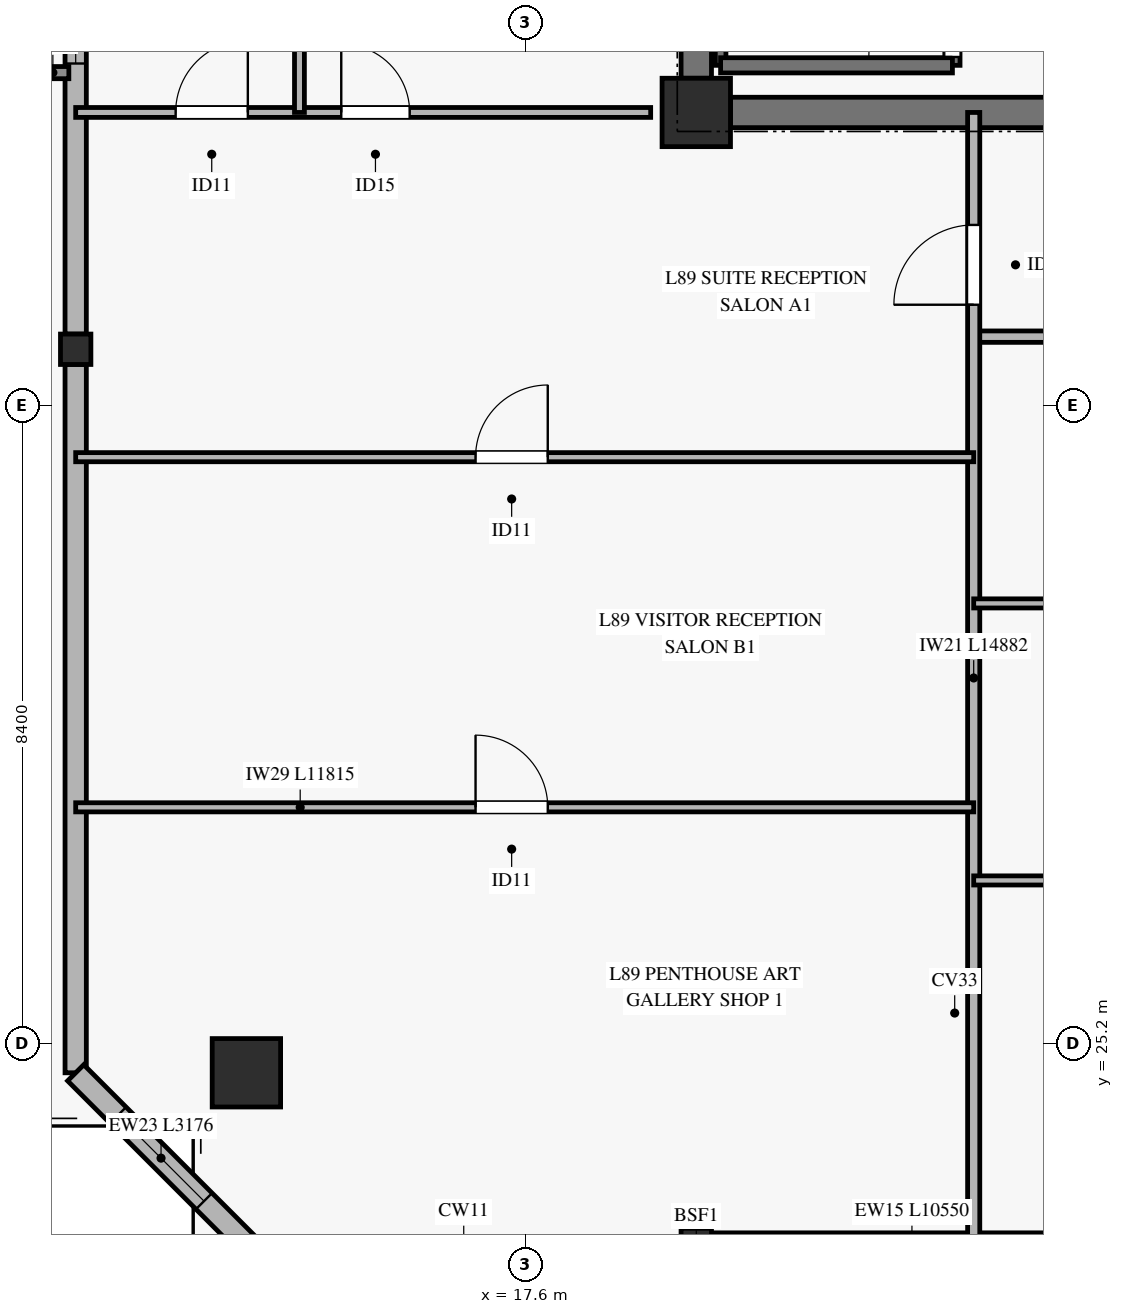
"""IFC4 building model, lengths in metres.
Left out: names, types, materials, properties, quantities, classifications, styles, units other than length and angle.
Written with IfcOpenShell. Run it as: python <this file> out.ifc"""

import sys

from ifc_helpers import new_model, si_unit, direction, frame, frame_2d, origin, origin_2d, place, context, subcontext, project, spatial, rectangle, hollow_rectangle, extrude, source, transform, mapped, element, fill, save


model = new_model("IFC4")
c1 = context("Model", 3, precision=1e-05, world=origin(), true_north=direction((0.0, 1.0)))
c2 = subcontext(c1, "Body", "Model", "MODEL_VIEW")
j1 = project(units=[si_unit("LENGTHUNIT", "METRE"), si_unit("PLANEANGLEUNIT", "RADIAN")], contexts=[c1])
p1 = place(None, origin())
s1 = spatial("IfcSite", under=j1, at=p1, CompositionType="ELEMENT")
p2 = place(p1, origin())
s2 = spatial("IfcBuilding", under=s1, at=p2, CompositionType="ELEMENT")
p3 = place(p2, frame((0.0, 0.0, 342.5)))
s3 = spatial("IfcBuildingStorey", under=s2, at=p3, CompositionType="ELEMENT", Elevation=342.5)
m1 = source(origin(), c2, "Body", "SweptSolid", [
    extrude(rectangle(XDim=0.9, YDim=0.9, at=origin_2d()), origin(), (0.0, 0.0, 1.0), 3.185),
])
p4 = place(p3, frame((19.85, 37.45, 0.0), z_axis=(0.0, 0.0, 1.0), x_axis=(1.0, 0.0, 0.0)))
e1 = element("IfcColumn", 1, at=p4, inside=s3, PredefinedType="PILASTER", context=c2, shape_type="MappedRepresentation", body=[
    mapped(m1, transform((0.0, 0.0, 0.0), x_axis=(1.0, 0.0, 0.0), y_axis=(0.0, 1.0, 0.0), z_axis=(0.0, 0.0, 1.0), scale=1.0)),
])
p5 = place(p3, frame((20.3, 37.45, 0.0), z_axis=(0.0, 0.0, 1.0), x_axis=(1.0, 0.0, 0.0)))
e2 = element("IfcWall", 2, at=p5, inside=s3, PredefinedType="SHEAR", context=c2, shape_type="SweptSolid", body=[
    extrude(rectangle(XDim=10.05, YDim=0.4, at=frame_2d((5.025, 0.0))), origin(), (0.0, 0.0, 1.0), 3.185),
])
p6 = place(p5, frame((4.25, 0.0, 0.0)))
e3 = element("IfcOpeningElement", 3, at=p6, cuts=e2, PredefinedType="OPENING", context=c2, shape_type="SweptSolid", body=[
    extrude(rectangle(XDim=1.2, YDim=2.15, at=frame_2d((0.6, 1.075))), frame((0.0, 0.21, 0.0), z_axis=(0.0, -1.0, 0.0), x_axis=(1.0, 0.0, 0.0)), (0.0, 0.0, 1.0), 0.42),
])
p7 = place(p3, frame((19.85, 37.9, 0.0), z_axis=(0.0, 0.0, 1.0), x_axis=(0.0, 1.0, 0.0)))
e4 = element("IfcWall", 4, at=p7, inside=s3, PredefinedType="SHEAR", context=c2, shape_type="SweptSolid", body=[
    extrude(rectangle(XDim=8.2, YDim=0.4, at=frame_2d((4.1, 0.0))), origin(), (0.0, 0.0, 1.0), 3.185),
])
m2 = source(origin(), c2, "Body", "SweptSolid", [
    extrude(hollow_rectangle(XDim=0.9, YDim=0.9, WallThickness=0.04, at=origin_2d()), origin(), (0.0, 0.0, 1.0), 3.326),
])
p8 = place(p3, frame((13.931, 24.814, 0.0), z_axis=(0.110968509205, 0.266339100467, 0.957470351252), x_axis=(-0.923084448442, 0.384597323242, 0.0)))
e5 = element("IfcColumn", 5, at=p8, inside=s3, PredefinedType="COLUMN", context=c2, shape_type="MappedRepresentation", body=[
    mapped(m2, transform((0.0, 0.0, 0.0), x_axis=(1.0, 0.0, 0.0), y_axis=(0.0, 1.0, 0.0), z_axis=(0.0, 0.0, 1.0), scale=1.0)),
])
m3 = source(origin(), c2, "Body", "SweptSolid", [
    extrude(hollow_rectangle(XDim=0.4, YDim=0.4, WallThickness=0.02, at=origin_2d()), origin(), (0.0, 0.0, 1.0), 3.319),
])
p9 = place(p3, frame((19.85, 22.568, 0.0), z_axis=(0.0, 0.280807850571, 0.959764008003), x_axis=(-1.0, 0.0, 0.0)))
e6 = element("IfcColumn", 6, at=p9, inside=s3, PredefinedType="COLUMN", context=c2, shape_type="MappedRepresentation", body=[
    mapped(m3, transform((0.0, 0.0, 0.0), x_axis=(1.0, 0.0, 0.0), y_axis=(0.0, 1.0, 0.0), z_axis=(0.0, 0.0, 1.0), scale=1.0)),
])
m4 = source(origin(), c2, "Body", "SweptSolid", [
    extrude(hollow_rectangle(XDim=0.4, YDim=0.4, WallThickness=0.02, at=origin_2d()), origin(), (0.0, 0.0, 1.0), 3.246),
])
p10 = place(p3, frame((11.685, 34.334, 0.0), z_axis=(0.127876528395, 0.143597819239, 0.981339523201), x_axis=(-0.746804669772, 0.665043446104, 0.0)))
e7 = element("IfcColumn", 7, at=p10, inside=s3, PredefinedType="COLUMN", context=c2, shape_type="MappedRepresentation", body=[
    mapped(m4, transform((0.0, 0.0, 0.0), x_axis=(1.0, 0.0, 0.0), y_axis=(0.0, 1.0, 0.0), z_axis=(0.0, 0.0, 1.0), scale=1.0)),
])
p11 = place(p3, frame((20.05, 22.568, 0.0), z_axis=(0.0, 0.0, 1.0), x_axis=(1.0, 0.0, 0.0)))
e8 = element("IfcWall", 8, at=p11, inside=s3, PredefinedType="SOLIDWALL", context=c2, shape_type="SweptSolid", body=[
    extrude(rectangle(XDim=10.55, YDim=0.28, at=frame_2d((5.275, 0.0))), origin(), (0.0, 0.0, 1.0), 2.815),
])
p12 = place(p11, frame((4.35, 0.0, 0.0)))
e9 = element("IfcOpeningElement", 9, at=p12, cuts=e8, PredefinedType="OPENING", context=c2, shape_type="SweptSolid", body=[
    extrude(rectangle(XDim=1.8, YDim=2.25, at=frame_2d((0.9, 1.125))), frame((0.0, 0.15, 0.0), z_axis=(0.0, -1.0, 0.0), x_axis=(1.0, 0.0, 0.0)), (0.0, 0.0, 1.0), 0.3),
])
p13 = place(p11, frame((0.65, 0.0, 0.45)))
e10 = element("IfcOpeningElement", 10, at=p13, cuts=e8, PredefinedType="OPENING", context=c2, shape_type="SweptSolid", body=[
    extrude(rectangle(XDim=2.2, YDim=2.1, at=frame_2d((1.1, 1.05))), frame((0.0, 0.15, 0.0), z_axis=(0.0, -1.0, 0.0), x_axis=(1.0, 0.0, 0.0)), (0.0, 0.0, 1.0), 0.3),
])
p14 = place(p11, frame((7.35, 0.0, 0.45)))
e11 = element("IfcOpeningElement", 11, at=p14, cuts=e8, PredefinedType="OPENING", context=c2, shape_type="SweptSolid", body=[
    extrude(rectangle(XDim=1.6, YDim=2.0, at=frame_2d((0.8, 1.0))), frame((0.0, 0.15, 0.0), z_axis=(0.0, -1.0, 0.0), x_axis=(1.0, 0.0, 0.0)), (0.0, 0.0, 1.0), 0.3),
])
p15 = place(p3, frame((11.685, 24.814, 0.0), z_axis=(0.0, 0.0, 1.0), x_axis=(0.0, 1.0, 0.0)))
e12 = element("IfcWall", 12, at=p15, inside=s3, PredefinedType="SOLIDWALL", context=c2, shape_type="SweptSolid", body=[
    extrude(rectangle(XDim=9.32, YDim=0.28, at=frame_2d((4.66, 0.0))), origin(), (0.0, 0.0, 1.0), 2.815),
])
p16 = place(p3, frame((11.685, 34.534, 0.0), z_axis=(0.0, 0.0, 1.0), x_axis=(0.0, 1.0, 0.0)))
e13 = element("IfcWall", 13, at=p16, inside=s3, PredefinedType="SOLIDWALL", context=c2, shape_type="SweptSolid", body=[
    extrude(rectangle(XDim=9.32, YDim=0.28, at=frame_2d((4.66, 0.0))), origin(), (0.0, 0.0, 1.0), 2.815),
])
p17 = place(p16, frame((3.56, 0.0, 0.45)))
e14 = element("IfcOpeningElement", 14, at=p17, cuts=e13, PredefinedType="OPENING", context=c2, shape_type="SweptSolid", body=[
    extrude(rectangle(XDim=2.2, YDim=2.1, at=frame_2d((1.1, 1.05))), frame((0.0, 0.15, 0.0), z_axis=(0.0, -1.0, 0.0), x_axis=(1.0, 0.0, 0.0)), (0.0, 0.0, 1.0), 0.3),
])
p18 = place(p3, frame((11.685, 24.814, 0.0), z_axis=(0.0, 0.0, 1.0), x_axis=(0.707106781187, -0.707106781187, 0.0)))
e15 = element("IfcWall", 15, at=p18, inside=s3, PredefinedType="SOLIDWALL", context=c2, shape_type="SweptSolid", body=[
    extrude(rectangle(XDim=3.176, YDim=0.3, at=frame_2d((1.588, 0.0))), origin(), (0.0, 0.0, 1.0), 2.815),
])
p19 = place(p18, frame((0.788, 0.0, 0.45)))
e16 = element("IfcOpeningElement", 16, at=p19, cuts=e15, PredefinedType="OPENING", context=c2, shape_type="SweptSolid", body=[
    extrude(rectangle(XDim=1.6, YDim=2.0, at=frame_2d((0.8, 1.0))), frame((0.0, 0.16, 0.0), z_axis=(0.0, -1.0, 0.0), x_axis=(1.0, 0.0, 0.0)), (0.0, 0.0, 1.0), 0.32),
])
p20 = place(p3, frame((20.17, 38.07, 0.0), z_axis=(0.0, 0.0, 1.0), x_axis=(0.0, 1.0, 0.0)))
e17 = element("IfcWall", 17, at=p20, inside=s3, PredefinedType="SOLIDWALL", context=c2, shape_type="SweptSolid", body=[
    extrude(rectangle(XDim=7.25, YDim=0.14, at=frame_2d((3.625, 0.0))), origin(), (0.0, 0.0, 1.0), 3.4),
])
p21 = place(p3, frame((23.22, 38.07, 0.0), z_axis=(0.0, 0.0, 1.0), x_axis=(0.0, 1.0, 0.0)))
e18 = element("IfcWall", 18, at=p21, inside=s3, PredefinedType="SOLIDWALL", context=c2, shape_type="SweptSolid", body=[
    extrude(rectangle(XDim=7.25, YDim=0.2, at=frame_2d((3.625, 0.0))), origin(), (0.0, 0.0, 1.0), 3.4),
])
p22 = place(p21, frame((0.11, 0.0, 0.0)))
e19 = element("IfcOpeningElement", 19, at=p22, cuts=e18, PredefinedType="OPENING", context=c2, shape_type="SweptSolid", body=[
    extrude(rectangle(XDim=1.1, YDim=2.15, at=frame_2d((0.55, 1.075))), frame((0.0, 0.11, 0.0), z_axis=(0.0, -1.0, 0.0), x_axis=(1.0, 0.0, 0.0)), (0.0, 0.0, 1.0), 0.22),
])
p23 = place(p3, frame((20.17, 38.07, 0.0), z_axis=(0.0, 0.0, 1.0), x_axis=(1.0, 0.0, 0.0)))
e20 = element("IfcWall", 20, at=p23, inside=s3, PredefinedType="SOLIDWALL", context=c2, shape_type="SweptSolid", body=[
    extrude(rectangle(XDim=3.05, YDim=0.2, at=frame_2d((1.525, 0.0))), origin(), (0.0, 0.0, 1.0), 3.4),
])
p24 = place(p3, frame((23.5, 34.5, 0.0), z_axis=(0.0, 0.0, 1.0), x_axis=(1.0, 0.0, 0.0)))
e21 = element("IfcWall", 21, at=p24, inside=s3, PredefinedType="PARTITIONING", context=c2, shape_type="SweptSolid", body=[
    extrude(rectangle(XDim=20.8, YDim=0.15, at=frame_2d((10.4, 0.0))), origin(), (0.0, 0.0, 1.0), 2.47),
])
p25 = place(p24, frame((4.767, 0.0, 0.0)))
e22 = element("IfcOpeningElement", 22, at=p25, cuts=e21, PredefinedType="OPENING", context=c2, shape_type="SweptSolid", body=[
    extrude(rectangle(XDim=1.05, YDim=2.15, at=frame_2d((0.525, 1.075))), frame((0.0, 0.085, 0.0), z_axis=(0.0, -1.0, 0.0), x_axis=(1.0, 0.0, 0.0)), (0.0, 0.0, 1.0), 0.17),
])
p26 = place(p24, frame((16.025, 0.0, 0.0)))
e23 = element("IfcOpeningElement", 23, at=p26, cuts=e21, PredefinedType="OPENING", context=c2, shape_type="SweptSolid", body=[
    extrude(rectangle(XDim=1.05, YDim=2.15, at=frame_2d((0.525, 1.075))), frame((0.0, 0.085, 0.0), z_axis=(0.0, -1.0, 0.0), x_axis=(1.0, 0.0, 0.0)), (0.0, 0.0, 1.0), 0.17),
])
p27 = place(p3, frame((23.5, 22.568, 0.0), z_axis=(0.0, 0.0, 1.0), x_axis=(0.0, 1.0, 0.0)))
e24 = element("IfcWall", 24, at=p27, inside=s3, PredefinedType="PARTITIONING", context=c2, shape_type="SweptSolid", body=[
    extrude(rectangle(XDim=14.882, YDim=0.16, at=frame_2d((7.441, 0.0))), origin(), (0.0, 0.0, 1.0), 2.77),
])
p28 = place(p27, frame((12.352, 0.0, 0.0)))
e25 = element("IfcOpeningElement", 25, at=p28, cuts=e24, PredefinedType="OPENING", context=c2, shape_type="SweptSolid", body=[
    extrude(rectangle(XDim=1.05, YDim=2.15, at=frame_2d((0.525, 1.075))), frame((0.0, 0.09, 0.0), z_axis=(0.0, -1.0, 0.0), x_axis=(1.0, 0.0, 0.0)), (0.0, 0.0, 1.0), 0.18),
])
p29 = place(p3, frame((11.685, 28.307, 0.0), z_axis=(0.0, 0.0, 1.0), x_axis=(1.0, 0.0, 0.0)))
e26 = element("IfcWall", 26, at=p29, inside=s3, PredefinedType="PARTITIONING", context=c2, shape_type="SweptSolid", body=[
    extrude(rectangle(XDim=11.815, YDim=0.12, at=frame_2d((5.907, 0.0))), origin(), (0.0, 0.0, 1.0), 2.47),
])
p30 = place(p29, frame((5.261, 0.0, 0.0)))
e27 = element("IfcOpeningElement", 27, at=p30, cuts=e26, PredefinedType="OPENING", context=c2, shape_type="SweptSolid", body=[
    extrude(rectangle(XDim=0.95, YDim=2.1, at=frame_2d((0.475, 1.05))), frame((0.0, 0.07, 0.0), z_axis=(0.0, -1.0, 0.0), x_axis=(1.0, 0.0, 0.0)), (0.0, 0.0, 1.0), 0.14),
])
p31 = place(p3, frame((11.685, 32.914, 0.0), z_axis=(0.0, 0.0, 1.0), x_axis=(1.0, 0.0, 0.0)))
e28 = element("IfcWall", 28, at=p31, inside=s3, PredefinedType="PARTITIONING", context=c2, shape_type="SweptSolid", body=[
    extrude(rectangle(XDim=11.815, YDim=0.12, at=frame_2d((5.907, 0.0))), origin(), (0.0, 0.0, 1.0), 2.47),
])
p32 = place(p31, frame((5.261, 0.0, 0.0)))
e29 = element("IfcOpeningElement", 29, at=p32, cuts=e28, PredefinedType="OPENING", context=c2, shape_type="SweptSolid", body=[
    extrude(rectangle(XDim=0.95, YDim=2.1, at=frame_2d((0.475, 1.05))), frame((0.0, 0.07, 0.0), z_axis=(0.0, -1.0, 0.0), x_axis=(1.0, 0.0, 0.0)), (0.0, 0.0, 1.0), 0.14),
])
p33 = place(p3, frame((23.5, 27.345, 0.0), z_axis=(0.0, 0.0, 1.0), x_axis=(1.0, 0.0, 0.0)))
e30 = element("IfcWall", 30, at=p33, inside=s3, PredefinedType="PARTITIONING", context=c2, shape_type="SweptSolid", body=[
    extrude(rectangle(XDim=12.1, YDim=0.12, at=frame_2d((6.05, 0.0))), origin(), (0.0, 0.0, 1.0), 2.47),
])
p34 = place(p33, frame((5.006, 0.0, 0.0)))
e31 = element("IfcOpeningElement", 31, at=p34, cuts=e30, PredefinedType="OPENING", context=c2, shape_type="SweptSolid", body=[
    extrude(rectangle(XDim=0.95, YDim=2.1, at=frame_2d((0.475, 1.05))), frame((0.0, 0.07, 0.0), z_axis=(0.0, -1.0, 0.0), x_axis=(1.0, 0.0, 0.0)), (0.0, 0.0, 1.0), 0.14),
])
p35 = place(p3, frame((23.5, 30.99, 0.0), z_axis=(0.0, 0.0, 1.0), x_axis=(1.0, 0.0, 0.0)))
e32 = element("IfcWall", 32, at=p35, inside=s3, PredefinedType="PARTITIONING", context=c2, shape_type="SweptSolid", body=[
    extrude(rectangle(XDim=12.1, YDim=0.12, at=frame_2d((6.05, 0.0))), origin(), (0.0, 0.0, 1.0), 2.47),
])
p36 = place(p35, frame((5.006, 0.0, 0.0)))
e33 = element("IfcOpeningElement", 33, at=p36, cuts=e32, PredefinedType="OPENING", context=c2, shape_type="SweptSolid", body=[
    extrude(rectangle(XDim=0.95, YDim=2.1, at=frame_2d((0.475, 1.05))), frame((0.0, 0.07, 0.0), z_axis=(0.0, -1.0, 0.0), x_axis=(1.0, 0.0, 0.0)), (0.0, 0.0, 1.0), 0.14),
])
p37 = place(p3, frame((11.685, 37.45, 0.0), z_axis=(0.0, 0.0, 1.0), x_axis=(1.0, 0.0, 0.0)))
e34 = element("IfcWall", 34, at=p37, inside=s3, PredefinedType="PARTITIONING", context=c2, shape_type="SweptSolid", body=[
    extrude(rectangle(XDim=7.565, YDim=0.13, at=frame_2d((3.782, 0.0))), origin(), (0.0, 0.0, 1.0), 2.82),
])
p38 = place(p37, frame((1.315, 0.0, 0.0)))
e35 = element("IfcOpeningElement", 35, at=p38, cuts=e34, PredefinedType="OPENING", context=c2, shape_type="SweptSolid", body=[
    extrude(rectangle(XDim=0.95, YDim=2.1, at=frame_2d((0.475, 1.05))), frame((0.0, 0.075, 0.0), z_axis=(0.0, -1.0, 0.0), x_axis=(1.0, 0.0, 0.0)), (0.0, 0.0, 1.0), 0.15),
])
p39 = place(p37, frame((3.494, 0.0, 0.0)))
e36 = element("IfcOpeningElement", 36, at=p39, cuts=e34, PredefinedType="OPENING", context=c2, shape_type="SweptSolid", body=[
    extrude(rectangle(XDim=0.9, YDim=2.1, at=frame_2d((0.45, 1.05))), frame((0.0, 0.075, 0.0), z_axis=(0.0, -1.0, 0.0), x_axis=(1.0, 0.0, 0.0)), (0.0, 0.0, 1.0), 0.15),
])
p40 = place(p3, frame((14.629, 37.45, 0.0), z_axis=(0.0, 0.0, 1.0), x_axis=(0.0, 1.0, 0.0)))
e37 = element("IfcWall", 37, at=p40, inside=s3, PredefinedType="PARTITIONING", context=c2, shape_type="SweptSolid", body=[
    extrude(rectangle(XDim=8.8, YDim=0.13, at=frame_2d((4.4, 0.0))), origin(), (0.0, 0.0, 1.0), 2.82),
])
m5 = source(origin(), c2, "Body", "SweptSolid", [
    extrude(rectangle(XDim=2.2, YDim=2.1, at=frame_2d((1.1, 1.05))), frame((0.0, 0.03, 0.0), z_axis=(0.0, -1.0, 0.0), x_axis=(1.0, 0.0, 0.0)), (0.0, 0.0, 1.0), 0.06),
])
p41 = place(p17, origin())
e38 = element("IfcWindow", 38, at=p41, inside=s3, PartitioningType="SINGLE_PANEL", PredefinedType="WINDOW", context=c2, shape_type="MappedRepresentation", body=[
    mapped(m5, transform((0.0, 0.0, 0.0), x_axis=(1.0, 0.0, 0.0), y_axis=(0.0, 1.0, 0.0), z_axis=(0.0, 0.0, 1.0), scale=1.0)),
])
fill(e14, e38)
m6 = source(origin(), c2, "Body", "SweptSolid", [
    extrude(rectangle(XDim=1.6, YDim=2.0, at=frame_2d((0.8, 1.0))), frame((0.0, 0.03, 0.0), z_axis=(0.0, -1.0, 0.0), x_axis=(1.0, 0.0, 0.0)), (0.0, 0.0, 1.0), 0.06),
])
p42 = place(p19, origin())
e39 = element("IfcWindow", 39, at=p42, inside=s3, PartitioningType="SINGLE_PANEL", PredefinedType="WINDOW", context=c2, shape_type="MappedRepresentation", body=[
    mapped(m6, transform((0.0, 0.0, 0.0), x_axis=(1.0, 0.0, 0.0), y_axis=(0.0, 1.0, 0.0), z_axis=(0.0, 0.0, 1.0), scale=1.0)),
])
fill(e16, e39)
m7 = source(origin(), c2, "Body", "SweptSolid", [
    extrude(rectangle(XDim=1.1, YDim=2.15, at=frame_2d((0.55, 1.075))), frame((0.0, 0.025, 0.0), z_axis=(0.0, -1.0, 0.0), x_axis=(1.0, 0.0, 0.0)), (0.0, 0.0, 1.0), 0.05),
])
p43 = place(p22, origin())
e40 = element("IfcDoor", 40, at=p43, inside=s3, OperationType="SINGLE_SWING_LEFT", PredefinedType="DOOR", context=c2, shape_type="MappedRepresentation", body=[
    mapped(m7, transform((0.0, 0.0, 0.0), x_axis=(1.0, 0.0, 0.0), y_axis=(0.0, 1.0, 0.0), z_axis=(0.0, 0.0, 1.0), scale=1.0)),
])
fill(e19, e40)
m8 = source(origin(), c2, "Body", "SweptSolid", [
    extrude(rectangle(XDim=1.05, YDim=2.15, at=frame_2d((0.525, 1.075))), frame((0.0, 0.025, 0.0), z_axis=(0.0, -1.0, 0.0), x_axis=(1.0, 0.0, 0.0)), (0.0, 0.0, 1.0), 0.05),
])
p44 = place(p28, origin())
e41 = element("IfcDoor", 41, at=p44, inside=s3, OperationType="SINGLE_SWING_LEFT", PredefinedType="DOOR", context=c2, shape_type="MappedRepresentation", body=[
    mapped(m8, transform((0.0, 0.0, 0.0), x_axis=(1.0, 0.0, 0.0), y_axis=(0.0, 1.0, 0.0), z_axis=(0.0, 0.0, 1.0), scale=1.0)),
])
fill(e25, e41)
m9 = source(origin(), c2, "Body", "SweptSolid", [
    extrude(rectangle(XDim=0.95, YDim=2.1, at=frame_2d((0.475, 1.05))), frame((0.0, 0.025, 0.0), z_axis=(0.0, -1.0, 0.0), x_axis=(1.0, 0.0, 0.0)), (0.0, 0.0, 1.0), 0.05),
])
p45 = place(p32, origin())
e42 = element("IfcDoor", 42, at=p45, inside=s3, OperationType="SINGLE_SWING_RIGHT", PredefinedType="DOOR", context=c2, shape_type="MappedRepresentation", body=[
    mapped(m9, transform((0.0, 0.0, 0.0), x_axis=(1.0, 0.0, 0.0), y_axis=(0.0, 1.0, 0.0), z_axis=(0.0, 0.0, 1.0), scale=1.0)),
])
fill(e29, e42)
p46 = place(p30, origin())
e43 = element("IfcDoor", 43, at=p46, inside=s3, OperationType="SINGLE_SWING_LEFT", PredefinedType="DOOR", context=c2, shape_type="MappedRepresentation", body=[
    mapped(m9, transform((0.0, 0.0, 0.0), x_axis=(1.0, 0.0, 0.0), y_axis=(0.0, 1.0, 0.0), z_axis=(0.0, 0.0, 1.0), scale=1.0)),
])
fill(e27, e43)
p47 = place(p38, origin())
e44 = element("IfcDoor", 44, at=p47, inside=s3, OperationType="SINGLE_SWING_RIGHT", PredefinedType="DOOR", context=c2, shape_type="MappedRepresentation", body=[
    mapped(m9, transform((0.0, 0.0, 0.0), x_axis=(1.0, 0.0, 0.0), y_axis=(0.0, 1.0, 0.0), z_axis=(0.0, 0.0, 1.0), scale=1.0)),
])
fill(e35, e44)
m10 = source(origin(), c2, "Body", "SweptSolid", [
    extrude(rectangle(XDim=0.9, YDim=2.1, at=frame_2d((0.45, 1.05))), frame((0.0, 0.025, 0.0), z_axis=(0.0, -1.0, 0.0), x_axis=(1.0, 0.0, 0.0)), (0.0, 0.0, 1.0), 0.05),
])
p48 = place(p39, origin())
e45 = element("IfcDoor", 45, at=p48, inside=s3, OperationType="SINGLE_SWING_LEFT", PredefinedType="DOOR", context=c2, shape_type="MappedRepresentation", body=[
    mapped(m10, transform((0.0, 0.0, 0.0), x_axis=(1.0, 0.0, 0.0), y_axis=(0.0, 1.0, 0.0), z_axis=(0.0, 0.0, 1.0), scale=1.0)),
])
fill(e36, e45)
save(model, sys.argv[1])
